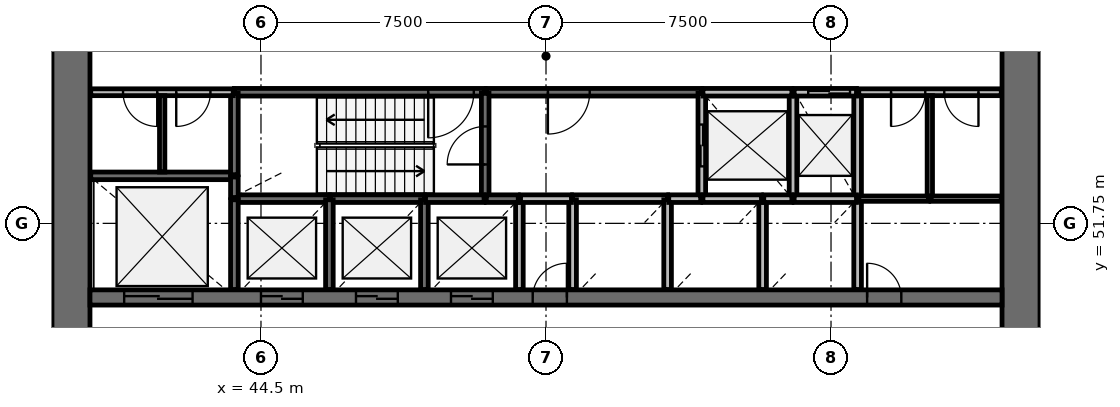
"""IFC4 building model, lengths in metres.
Left out: names, types, materials, properties, quantities, classifications, styles, units other than length and angle.
Written with IfcOpenShell. Run it as: python <this file> out.ifc"""

import sys

from ifc_helpers import new_model, si_unit, direction, frame, frame_2d, origin, place, context, subcontext, project, spatial, rectangle, extrude, source, transform, mapped, element, fill, save


model = new_model("IFC4")
c1 = context("Model", 3, precision=1e-05, world=origin(), true_north=direction((0.0, 1.0)))
c2 = subcontext(c1, "Body", "Model", "MODEL_VIEW")
j1 = project(units=[si_unit("LENGTHUNIT", "METRE"), si_unit("PLANEANGLEUNIT", "RADIAN")], contexts=[c1])
p1 = place(None, origin())
s1 = spatial("IfcSite", under=j1, at=p1, CompositionType="ELEMENT")
p2 = place(p1, origin())
s2 = spatial("IfcBuilding", under=s1, at=p2, CompositionType="ELEMENT")
p3 = place(p2, frame((0.0, 0.0, 44.6)))
s3 = spatial("IfcBuildingStorey", under=s2, at=p3, CompositionType="ELEMENT", Elevation=44.6)
p4 = place(p3, frame((64.5, 38.0, 0.0), z_axis=(0.0, 0.0, 1.0), x_axis=(0.0, 1.0, 0.0)))
e1 = element("IfcWall", 1, at=p4, inside=s3, PredefinedType="SHEAR", context=c2, shape_type="SweptSolid", body=[
    extrude(rectangle(XDim=20.0, YDim=1.0, at=frame_2d((10.0, 0.0))), origin(), (0.0, 0.0, 1.0), 4.4),
])
p5 = place(p4, frame((9.1, 0.0, 0.0)))
e2 = element("IfcOpeningElement", 2, at=p5, cuts=e1, PredefinedType="OPENING", context=c2, shape_type="SweptSolid", body=[
    extrude(rectangle(XDim=1.8, YDim=2.1, at=frame_2d((0.9, 1.05))), frame((0.0, 0.51, 0.0), z_axis=(0.0, -1.0, 0.0), x_axis=(1.0, 0.0, 0.0)), (0.0, 0.0, 1.0), 1.02),
])
p6 = place(p3, frame((39.5, 58.0, 0.0), z_axis=(0.0, 0.0, 1.0), x_axis=(0.0, -1.0, 0.0)))
e3 = element("IfcWall", 3, at=p6, inside=s3, PredefinedType="SHEAR", context=c2, shape_type="SweptSolid", body=[
    extrude(rectangle(XDim=20.0, YDim=1.0, at=frame_2d((10.0, 0.0))), origin(), (0.0, 0.0, 1.0), 4.4),
])
p7 = place(p6, frame((9.1, 0.0, 0.0)))
e4 = element("IfcOpeningElement", 4, at=p7, cuts=e3, PredefinedType="OPENING", context=c2, shape_type="SweptSolid", body=[
    extrude(rectangle(XDim=1.8, YDim=2.1, at=frame_2d((0.9, 1.05))), frame((0.0, 0.51, 0.0), z_axis=(0.0, -1.0, 0.0), x_axis=(1.0, 0.0, 0.0)), (0.0, 0.0, 1.0), 1.02),
])
p8 = place(p3, frame((40.0, 49.8, 0.0), z_axis=(0.0, 0.0, 1.0), x_axis=(1.0, 0.0, 0.0)))
e5 = element("IfcWall", 5, at=p8, inside=s3, PredefinedType="SHEAR", context=c2, shape_type="SweptSolid", body=[
    extrude(rectangle(XDim=24.0, YDim=0.4, at=frame_2d((12.0, 0.0))), origin(), (0.0, 0.0, 1.0), 4.4),
])
p9 = place(p8, frame((4.5, 0.0, 0.0)))
e6 = element("IfcOpeningElement", 6, at=p9, cuts=e5, PredefinedType="OPENING", context=c2, shape_type="SweptSolid", body=[
    extrude(rectangle(XDim=1.1, YDim=2.1, at=frame_2d((0.55, 1.05))), frame((0.0, 0.21, 0.0), z_axis=(0.0, -1.0, 0.0), x_axis=(1.0, 0.0, 0.0)), (0.0, 0.0, 1.0), 0.42),
])
p10 = place(p8, frame((7.0, 0.0, 0.0)))
e7 = element("IfcOpeningElement", 7, at=p10, cuts=e5, PredefinedType="OPENING", context=c2, shape_type="SweptSolid", body=[
    extrude(rectangle(XDim=1.1, YDim=2.1, at=frame_2d((0.55, 1.05))), frame((0.0, 0.21, 0.0), z_axis=(0.0, -1.0, 0.0), x_axis=(1.0, 0.0, 0.0)), (0.0, 0.0, 1.0), 0.42),
])
p11 = place(p8, frame((9.5, 0.0, 0.0)))
e8 = element("IfcOpeningElement", 8, at=p11, cuts=e5, PredefinedType="OPENING", context=c2, shape_type="SweptSolid", body=[
    extrude(rectangle(XDim=1.1, YDim=2.1, at=frame_2d((0.55, 1.05))), frame((0.0, 0.21, 0.0), z_axis=(0.0, -1.0, 0.0), x_axis=(1.0, 0.0, 0.0)), (0.0, 0.0, 1.0), 0.42),
])
p12 = place(p8, frame((0.9, 0.0, 0.0)))
e9 = element("IfcOpeningElement", 9, at=p12, cuts=e5, PredefinedType="OPENING", context=c2, shape_type="SweptSolid", body=[
    extrude(rectangle(XDim=1.8, YDim=2.4, at=frame_2d((0.9, 1.2))), frame((0.0, 0.21, 0.0), z_axis=(0.0, -1.0, 0.0), x_axis=(1.0, 0.0, 0.0)), (0.0, 0.0, 1.0), 0.42),
])
p13 = place(p8, frame((20.45, 0.0, 0.0)))
e10 = element("IfcOpeningElement", 10, at=p13, cuts=e5, PredefinedType="OPENING", context=c2, shape_type="SweptSolid", body=[
    extrude(rectangle(XDim=0.9, YDim=2.1, at=frame_2d((0.45, 1.05))), frame((0.0, 0.21, 0.0), z_axis=(0.0, -1.0, 0.0), x_axis=(1.0, 0.0, 0.0)), (0.0, 0.0, 1.0), 0.42),
])
p14 = place(p8, frame((11.65, 0.0, 0.0)))
e11 = element("IfcOpeningElement", 11, at=p14, cuts=e5, PredefinedType="OPENING", context=c2, shape_type="SweptSolid", body=[
    extrude(rectangle(XDim=0.9, YDim=2.1, at=frame_2d((0.45, 1.05))), frame((0.0, 0.21, 0.0), z_axis=(0.0, -1.0, 0.0), x_axis=(1.0, 0.0, 0.0)), (0.0, 0.0, 1.0), 0.42),
])
p15 = place(p3, frame((50.4, 55.2, 0.0), z_axis=(0.0, 0.0, 1.0), x_axis=(-1.0, 0.0, 0.0)))
e12 = element("IfcWall", 12, at=p15, inside=s3, PredefinedType="SOLIDWALL", context=c2, shape_type="SweptSolid", body=[
    extrude(rectangle(XDim=6.6, YDim=0.2, at=frame_2d((3.3, 0.0))), origin(), (0.0, 0.0, 1.0), 3.95),
])
p16 = place(p15, frame((0.3, 0.0, 0.0)))
e13 = element("IfcOpeningElement", 13, at=p16, cuts=e12, PredefinedType="OPENING", context=c2, shape_type="SweptSolid", body=[
    extrude(rectangle(XDim=1.2, YDim=2.1, at=frame_2d((0.6, 1.05))), frame((0.0, 0.11, 0.0), z_axis=(0.0, -1.0, 0.0), x_axis=(1.0, 0.0, 0.0)), (0.0, 0.0, 1.0), 0.22),
])
p17 = place(p3, frame((56.1, 55.2, 0.0), z_axis=(0.0, 0.0, 1.0), x_axis=(-1.0, 0.0, 0.0)))
e14 = element("IfcWall", 14, at=p17, inside=s3, PredefinedType="SOLIDWALL", context=c2, shape_type="SweptSolid", body=[
    extrude(rectangle(XDim=5.67, YDim=0.2, at=frame_2d((2.835, 0.0))), origin(), (0.0, 0.0, 1.0), 3.95),
])
p18 = place(p17, frame((2.95, 0.0, 0.0)))
e15 = element("IfcOpeningElement", 15, at=p18, cuts=e14, PredefinedType="OPENING", context=c2, shape_type="SweptSolid", body=[
    extrude(rectangle(XDim=1.1, YDim=2.1, at=frame_2d((0.55, 1.05))), frame((0.0, 0.11, 0.0), z_axis=(0.0, -1.0, 0.0), x_axis=(1.0, 0.0, 0.0)), (0.0, 0.0, 1.0), 0.22),
])
p19 = place(p3, frame((43.8, 53.0, 0.0), z_axis=(0.0, 0.0, 1.0), x_axis=(-1.0, 0.0, 0.0)))
e16 = element("IfcWall", 16, at=p19, inside=s3, PredefinedType="SOLIDWALL", context=c2, shape_type="SweptSolid", body=[
    extrude(rectangle(XDim=3.78, YDim=0.2, at=frame_2d((1.89, 0.0))), origin(), (0.0, 0.0, 1.0), 3.95),
])
p20 = place(p3, frame((50.4, 52.4, 0.0), z_axis=(0.0, 0.0, 1.0), x_axis=(0.0, 1.0, 0.0)))
e17 = element("IfcWall", 17, at=p20, inside=s3, PredefinedType="SOLIDWALL", context=c2, shape_type="SweptSolid", body=[
    extrude(rectangle(XDim=2.77, YDim=0.2, at=frame_2d((1.385, 0.0))), origin(), (0.0, 0.0, 1.0), 3.95),
])
p21 = place(p20, frame((0.9, 0.0, 0.0)))
e18 = element("IfcOpeningElement", 18, at=p21, cuts=e17, PredefinedType="OPENING", context=c2, shape_type="SweptSolid", body=[
    extrude(rectangle(XDim=1.0, YDim=2.1, at=frame_2d((0.5, 1.05))), frame((0.0, 0.11, 0.0), z_axis=(0.0, -1.0, 0.0), x_axis=(1.0, 0.0, 0.0)), (0.0, 0.0, 1.0), 0.22),
])
p22 = place(p3, frame((56.1, 55.17, 0.0), z_axis=(0.0, 0.0, 1.0), x_axis=(0.0, -1.0, 0.0)))
e19 = element("IfcWall", 19, at=p22, inside=s3, PredefinedType="SOLIDWALL", context=c2, shape_type="SweptSolid", body=[
    extrude(rectangle(XDim=2.77, YDim=0.2, at=frame_2d((1.385, 0.0))), origin(), (0.0, 0.0, 1.0), 3.95),
])
p23 = place(p22, frame((0.82, 0.0, 0.0)))
e20 = element("IfcOpeningElement", 20, at=p23, cuts=e19, PredefinedType="OPENING", context=c2, shape_type="SweptSolid", body=[
    extrude(rectangle(XDim=1.1, YDim=2.1, at=frame_2d((0.55, 1.05))), frame((0.0, 0.11, 0.0), z_axis=(0.0, -1.0, 0.0), x_axis=(1.0, 0.0, 0.0)), (0.0, 0.0, 1.0), 0.22),
])
for number, where, z_axis, x_axis in (
    (21, (58.5, 52.4, 0.0), (0.0, 0.0, 1.0), (0.0, 1.0, 0.0)),
    (22, (60.2, 52.4, 0.0), (0.0, 0.0, 1.0), (0.0, 1.0, 0.0)),
):
    element("IfcWall", number, at=place(p3, frame(where, z_axis=z_axis, x_axis=x_axis)), inside=s3, PredefinedType="SOLIDWALL", context=c2, shape_type="SweptSolid", body=[
        extrude(rectangle(XDim=2.8, YDim=0.2, at=frame_2d((1.4, 0.0))), origin(), (0.0, 0.0, 1.0), 3.95),
    ])
p24 = place(p3, frame((46.3, 52.4, 0.0), z_axis=(0.0, 0.0, 1.0), x_axis=(-1.0, 0.0, 0.0)))
e23 = element("IfcWall", 23, at=p24, inside=s3, PredefinedType="SOLIDWALL", context=c2, shape_type="SweptSolid", body=[
    extrude(rectangle(XDim=2.5, YDim=0.2, at=frame_2d((1.25, 0.0))), origin(), (0.0, 0.0, 1.0), 3.95),
])
p25 = place(p3, frame((48.8, 52.4, 0.0), z_axis=(0.0, 0.0, 1.0), x_axis=(-1.0, 0.0, 0.0)))
e24 = element("IfcWall", 24, at=p25, inside=s3, PredefinedType="SOLIDWALL", context=c2, shape_type="SweptSolid", body=[
    extrude(rectangle(XDim=2.47, YDim=0.2, at=frame_2d((1.235, 0.0))), origin(), (0.0, 0.0, 1.0), 3.95),
])
p26 = place(p3, frame((55.2, 52.4, 0.0), z_axis=(0.0, 0.0, 1.0), x_axis=(-1.0, 0.0, 0.0)))
e25 = element("IfcWall", 25, at=p26, inside=s3, PredefinedType="SOLIDWALL", context=c2, shape_type="SweptSolid", body=[
    extrude(rectangle(XDim=2.5, YDim=0.2, at=frame_2d((1.25, 0.0))), origin(), (0.0, 0.0, 1.0), 3.95),
])
p27 = place(p3, frame((58.47, 55.2, 0.0), z_axis=(0.0, 0.0, 1.0), x_axis=(-1.0, 0.0, 0.0)))
e26 = element("IfcWall", 26, at=p27, inside=s3, PredefinedType="SOLIDWALL", context=c2, shape_type="SweptSolid", body=[
    extrude(rectangle(XDim=2.34, YDim=0.2, at=frame_2d((1.17, 0.0))), origin(), (0.0, 0.0, 1.0), 3.95),
])
for number, where, z_axis, x_axis in (
    (27, (43.8, 52.37, 0.0), (0.0, 0.0, 1.0), (0.0, -1.0, 0.0)),
    (28, (46.3, 50.01, 0.0), (0.0, 0.0, 1.0), (0.0, 1.0, 0.0)),
    (29, (48.8, 50.01, 0.0), (0.0, 0.0, 1.0), (0.0, 1.0, 0.0)),
):
    element("IfcWall", number, at=place(p3, frame(where, z_axis=z_axis, x_axis=x_axis)), inside=s3, PredefinedType="SOLIDWALL", context=c2, shape_type="SweptSolid", body=[
        extrude(rectangle(XDim=2.36, YDim=0.2, at=frame_2d((1.18, 0.0))), origin(), (0.0, 0.0, 1.0), 3.95),
    ])
p28 = place(p3, frame((51.3, 50.01, 0.0), z_axis=(0.0, 0.0, 1.0), x_axis=(0.0, 1.0, 0.0)))
e30 = element("IfcWall", 30, at=p28, inside=s3, PredefinedType="SOLIDWALL", context=c2, shape_type="SweptSolid", body=[
    extrude(rectangle(XDim=2.39, YDim=0.2, at=frame_2d((1.195, 0.0))), origin(), (0.0, 0.0, 1.0), 3.95),
])
for number, where, z_axis, x_axis in (
    (31, (52.7, 52.37, 0.0), (0.0, 0.0, 1.0), (0.0, -1.0, 0.0)),
    (32, (55.2, 50.01, 0.0), (0.0, 0.0, 1.0), (0.0, 1.0, 0.0)),
):
    element("IfcWall", number, at=place(p3, frame(where, z_axis=z_axis, x_axis=x_axis)), inside=s3, PredefinedType="SOLIDWALL", context=c2, shape_type="SweptSolid", body=[
        extrude(rectangle(XDim=2.36, YDim=0.2, at=frame_2d((1.18, 0.0))), origin(), (0.0, 0.0, 1.0), 3.95),
    ])
p29 = place(p3, frame((57.7, 50.01, 0.0), z_axis=(0.0, 0.0, 1.0), x_axis=(0.0, 1.0, 0.0)))
e33 = element("IfcWall", 33, at=p29, inside=s3, PredefinedType="SOLIDWALL", context=c2, shape_type="SweptSolid", body=[
    extrude(rectangle(XDim=2.39, YDim=0.2, at=frame_2d((1.195, 0.0))), origin(), (0.0, 0.0, 1.0), 3.95),
])
p30 = place(p3, frame((60.2, 50.01, 0.0), z_axis=(0.0, 0.0, 1.0), x_axis=(0.0, 1.0, 0.0)))
e34 = element("IfcWall", 34, at=p30, inside=s3, PredefinedType="SOLIDWALL", context=c2, shape_type="SweptSolid", body=[
    extrude(rectangle(XDim=2.36, YDim=0.2, at=frame_2d((1.18, 0.0))), origin(), (0.0, 0.0, 1.0), 3.95),
])
p31 = place(p3, frame((43.8, 55.17, 0.0), z_axis=(0.0, 0.0, 1.0), x_axis=(0.0, -1.0, 0.0)))
e35 = element("IfcWall", 35, at=p31, inside=s3, PredefinedType="SOLIDWALL", context=c2, shape_type="SweptSolid", body=[
    extrude(rectangle(XDim=2.14, YDim=0.2, at=frame_2d((1.07, 0.0))), origin(), (0.0, 0.0, 1.0), 3.95),
])
p32 = place(p3, frame((60.17, 52.4, 0.0), z_axis=(0.0, 0.0, 1.0), x_axis=(-1.0, 0.0, 0.0)))
e36 = element("IfcWall", 36, at=p32, inside=s3, PredefinedType="SOLIDWALL", context=c2, shape_type="SweptSolid", body=[
    extrude(rectangle(XDim=1.64, YDim=0.2, at=frame_2d((0.82, 0.0))), origin(), (0.0, 0.0, 1.0), 3.95),
])
p33 = place(p3, frame((60.17, 55.2, 0.0), z_axis=(0.0, 0.0, 1.0), x_axis=(-1.0, 0.0, 0.0)))
e37 = element("IfcWall", 37, at=p33, inside=s3, PredefinedType="SOLIDWALL", context=c2, shape_type="SweptSolid", body=[
    extrude(rectangle(XDim=1.64, YDim=0.2, at=frame_2d((0.82, 0.0))), origin(), (0.0, 0.0, 1.0), 3.95),
])
p34 = place(p33, frame((0.17, 0.0, 0.0)))
e38 = element("IfcOpeningElement", 38, at=p34, cuts=e37, PredefinedType="OPENING", context=c2, shape_type="SweptSolid", body=[
    extrude(rectangle(XDim=1.1, YDim=2.1, at=frame_2d((0.55, 1.05))), frame((0.0, 0.11, 0.0), z_axis=(0.0, -1.0, 0.0), x_axis=(1.0, 0.0, 0.0)), (0.0, 0.0, 1.0), 0.22),
])
for number, where, z_axis, x_axis in (
    (39, (50.37, 52.4, 0.0), (0.0, 0.0, 1.0), (-1.0, 0.0, 0.0)),
    (40, (57.67, 52.4, 0.0), (0.0, 0.0, 1.0), (-1.0, 0.0, 0.0)),
):
    element("IfcWall", number, at=place(p3, frame(where, z_axis=z_axis, x_axis=x_axis)), inside=s3, PredefinedType="SOLIDWALL", context=c2, shape_type="SweptSolid", body=[
        extrude(rectangle(XDim=1.54, YDim=0.2, at=frame_2d((0.77, 0.0))), origin(), (0.0, 0.0, 1.0), 3.95),
    ])
p35 = place(p3, frame((51.33, 52.4, 0.0), z_axis=(0.0, 0.0, 1.0), x_axis=(1.0, 0.0, 0.0)))
e41 = element("IfcWall", 41, at=p35, inside=s3, PredefinedType="SOLIDWALL", context=c2, shape_type="SweptSolid", body=[
    extrude(rectangle(XDim=1.34, YDim=0.2, at=frame_2d((0.67, 0.0))), origin(), (0.0, 0.0, 1.0), 3.95),
])
for number, where, z_axis, x_axis in (
    (42, (51.27, 52.4, 0.0), (0.0, 0.0, 1.0), (-1.0, 0.0, 0.0)),
    (43, (56.07, 52.4, 0.0), (0.0, 0.0, 1.0), (-1.0, 0.0, 0.0)),
):
    element("IfcWall", number, at=place(p3, frame(where, z_axis=z_axis, x_axis=x_axis)), inside=s3, PredefinedType="SOLIDWALL", context=c2, shape_type="SweptSolid", body=[
        extrude(rectangle(XDim=0.84, YDim=0.2, at=frame_2d((0.42, 0.0))), origin(), (0.0, 0.0, 1.0), 3.95),
    ])
p36 = place(p3, frame((58.47, 52.4, 0.0), z_axis=(0.0, 0.0, 1.0), x_axis=(-1.0, 0.0, 0.0)))
e44 = element("IfcWall", 44, at=p36, inside=s3, PredefinedType="SOLIDWALL", context=c2, shape_type="SweptSolid", body=[
    extrude(rectangle(XDim=0.74, YDim=0.2, at=frame_2d((0.37, 0.0))), origin(), (0.0, 0.0, 1.0), 3.95),
])
p37 = place(p3, frame((43.8, 52.43, 0.0), z_axis=(0.0, 0.0, 1.0), x_axis=(0.0, 1.0, 0.0)))
e45 = element("IfcWall", 45, at=p37, inside=s3, PredefinedType="SOLIDWALL", context=c2, shape_type="SweptSolid", body=[
    extrude(rectangle(XDim=0.54, YDim=0.2, at=frame_2d((0.27, 0.0))), origin(), (0.0, 0.0, 1.0), 3.95),
])
p38 = place(p3, frame((43.77, 55.2, 0.0), z_axis=(0.0, 0.0, 1.0), x_axis=(-1.0, 0.0, 0.0)))
e46 = element("IfcWall", 46, at=p38, inside=s3, PredefinedType="PARTITIONING", context=c2, shape_type="SweptSolid", body=[
    extrude(rectangle(XDim=3.75, YDim=0.18, at=frame_2d((1.875, 0.0))), origin(), (0.0, 0.0, 1.0), 3.95),
])
p39 = place(p38, frame((2.0, 0.0, 0.0)))
e47 = element("IfcOpeningElement", 47, at=p39, cuts=e46, PredefinedType="OPENING", context=c2, shape_type="SweptSolid", body=[
    extrude(rectangle(XDim=0.9, YDim=2.1, at=frame_2d((0.45, 1.05))), frame((0.0, 0.1, 0.0), z_axis=(0.0, -1.0, 0.0), x_axis=(1.0, 0.0, 0.0)), (0.0, 0.0, 1.0), 0.2),
])
p40 = place(p38, frame((0.6, 0.0, 0.0)))
e48 = element("IfcOpeningElement", 48, at=p40, cuts=e46, PredefinedType="OPENING", context=c2, shape_type="SweptSolid", body=[
    extrude(rectangle(XDim=0.9, YDim=2.1, at=frame_2d((0.45, 1.05))), frame((0.0, 0.1, 0.0), z_axis=(0.0, -1.0, 0.0), x_axis=(1.0, 0.0, 0.0)), (0.0, 0.0, 1.0), 0.2),
])
p41 = place(p3, frame((63.98, 55.2, 0.0), z_axis=(0.0, 0.0, 1.0), x_axis=(-1.0, 0.0, 0.0)))
e49 = element("IfcWall", 49, at=p41, inside=s3, PredefinedType="PARTITIONING", context=c2, shape_type="SweptSolid", body=[
    extrude(rectangle(XDim=3.75, YDim=0.18, at=frame_2d((1.875, 0.0))), origin(), (0.0, 0.0, 1.0), 3.95),
])
p42 = place(p41, frame((2.0, 0.0, 0.0)))
e50 = element("IfcOpeningElement", 50, at=p42, cuts=e49, PredefinedType="OPENING", context=c2, shape_type="SweptSolid", body=[
    extrude(rectangle(XDim=0.9, YDim=2.1, at=frame_2d((0.45, 1.05))), frame((0.0, 0.1, 0.0), z_axis=(0.0, -1.0, 0.0), x_axis=(1.0, 0.0, 0.0)), (0.0, 0.0, 1.0), 0.2),
])
p43 = place(p41, frame((0.6, 0.0, 0.0)))
e51 = element("IfcOpeningElement", 51, at=p43, cuts=e49, PredefinedType="OPENING", context=c2, shape_type="SweptSolid", body=[
    extrude(rectangle(XDim=0.9, YDim=2.1, at=frame_2d((0.45, 1.05))), frame((0.0, 0.1, 0.0), z_axis=(0.0, -1.0, 0.0), x_axis=(1.0, 0.0, 0.0)), (0.0, 0.0, 1.0), 0.2),
])
p44 = place(p3, frame((62.1, 52.4, 0.0), z_axis=(0.0, 0.0, 1.0), x_axis=(0.0, 1.0, 0.0)))
e52 = element("IfcWall", 52, at=p44, inside=s3, PredefinedType="PARTITIONING", context=c2, shape_type="SweptSolid", body=[
    extrude(rectangle(XDim=2.71, YDim=0.14, at=frame_2d((1.355, 0.0))), origin(), (0.0, 0.0, 1.0), 3.05),
])
p45 = place(p3, frame((41.9, 53.1, 0.0), z_axis=(0.0, 0.0, 1.0), x_axis=(0.0, 1.0, 0.0)))
e53 = element("IfcWall", 53, at=p45, inside=s3, PredefinedType="PARTITIONING", context=c2, shape_type="SweptSolid", body=[
    extrude(rectangle(XDim=2.01, YDim=0.14, at=frame_2d((1.005, 0.0))), origin(), (0.0, 0.0, 1.0), 3.05),
])
p46 = place(p3, frame((62.07, 52.4, 0.0), z_axis=(0.0, 0.0, 1.0), x_axis=(-1.0, 0.0, 0.0)))
e54 = element("IfcWall", 54, at=p46, inside=s3, PredefinedType="PARTITIONING", context=c2, shape_type="SweptSolid", body=[
    extrude(rectangle(XDim=1.84, YDim=0.14, at=frame_2d((0.92, 0.0))), origin(), (0.0, 0.0, 1.0), 3.05),
])
p47 = place(p3, frame((63.98, 52.4, 0.0), z_axis=(0.0, 0.0, 1.0), x_axis=(-1.0, 0.0, 0.0)))
e55 = element("IfcWall", 55, at=p47, inside=s3, PredefinedType="PARTITIONING", context=c2, shape_type="SweptSolid", body=[
    extrude(rectangle(XDim=1.85, YDim=0.14, at=frame_2d((0.925, 0.0))), origin(), (0.0, 0.0, 1.0), 3.05),
])
m1 = source(origin(), c2, "Body", "SweptSolid", [
    extrude(rectangle(XDim=1.1, YDim=2.1, at=frame_2d((0.55, 1.05))), frame((0.0, 0.025, 0.0), z_axis=(0.0, -1.0, 0.0), x_axis=(1.0, 0.0, 0.0)), (0.0, 0.0, 1.0), 0.05),
])
p48 = place(p9, origin())
e56 = element("IfcDoor", 56, at=p48, inside=s3, OperationType="DOUBLE_DOOR_SLIDING", PredefinedType="USERDEFINED", context=c2, shape_type="MappedRepresentation", body=[
    mapped(m1, transform((0.0, 0.0, 0.0), scale=1.0)),
])
fill(e6, e56)
p49 = place(p10, origin())
e57 = element("IfcDoor", 57, at=p49, inside=s3, OperationType="DOUBLE_DOOR_SLIDING", PredefinedType="USERDEFINED", context=c2, shape_type="MappedRepresentation", body=[
    mapped(m1, transform((0.0, 0.0, 0.0), scale=1.0)),
])
fill(e7, e57)
p50 = place(p11, origin())
e58 = element("IfcDoor", 58, at=p50, inside=s3, OperationType="DOUBLE_DOOR_SLIDING", PredefinedType="USERDEFINED", context=c2, shape_type="MappedRepresentation", body=[
    mapped(m1, transform((0.0, 0.0, 0.0), scale=1.0)),
])
fill(e8, e58)
p51 = place(p23, origin())
e59 = element("IfcDoor", 59, at=p51, inside=s3, OperationType="DOUBLE_DOOR_SLIDING", PredefinedType="USERDEFINED", context=c2, shape_type="MappedRepresentation", body=[
    mapped(m1, transform((0.0, 0.0, 0.0), scale=1.0)),
])
fill(e20, e59)
p52 = place(p34, origin())
e60 = element("IfcDoor", 60, at=p52, inside=s3, OperationType="DOUBLE_DOOR_SLIDING", PredefinedType="USERDEFINED", context=c2, shape_type="MappedRepresentation", body=[
    mapped(m1, transform((0.0, 0.0, 0.0), scale=1.0)),
])
fill(e38, e60)
m2 = source(origin(), c2, "Body", "SweptSolid", [
    extrude(rectangle(XDim=1.8, YDim=2.4, at=frame_2d((0.9, 1.2))), frame((0.0, 0.025, 0.0), z_axis=(0.0, -1.0, 0.0), x_axis=(1.0, 0.0, 0.0)), (0.0, 0.0, 1.0), 0.05),
])
p53 = place(p12, origin())
e61 = element("IfcDoor", 61, at=p53, inside=s3, OperationType="DOUBLE_DOOR_SLIDING", PredefinedType="USERDEFINED", context=c2, shape_type="MappedRepresentation", body=[
    mapped(m2, transform((0.0, 0.0, 0.0), scale=1.0)),
])
fill(e9, e61)
m3 = source(origin(), c2, "Body", "SweptSolid", [
    extrude(rectangle(XDim=1.2, YDim=2.1, at=frame_2d((0.6, 1.05))), frame((0.0, 0.025, 0.0), z_axis=(0.0, -1.0, 0.0), x_axis=(1.0, 0.0, 0.0)), (0.0, 0.0, 1.0), 0.05),
])
p54 = place(p16, origin())
e62 = element("IfcDoor", 62, at=p54, inside=s3, OperationType="SINGLE_SWING_RIGHT", PredefinedType="DOOR", context=c2, shape_type="MappedRepresentation", body=[
    mapped(m3, transform((0.0, 0.0, 0.0), scale=1.0)),
])
fill(e13, e62)
m4 = source(origin(), c2, "Body", "SweptSolid", [
    extrude(rectangle(XDim=1.0, YDim=2.1, at=frame_2d((0.5, 1.05))), frame((0.0, 0.025, 0.0), z_axis=(0.0, -1.0, 0.0), x_axis=(1.0, 0.0, 0.0)), (0.0, 0.0, 1.0), 0.05),
])
p55 = place(p21, origin())
e63 = element("IfcDoor", 63, at=p55, inside=s3, OperationType="SINGLE_SWING_LEFT", PredefinedType="DOOR", context=c2, shape_type="MappedRepresentation", body=[
    mapped(m4, transform((0.0, 0.0, 0.0), scale=1.0)),
])
fill(e18, e63)
m5 = source(origin(), c2, "Body", "SweptSolid", [
    extrude(rectangle(XDim=1.1, YDim=2.1, at=frame_2d((0.55, 1.05))), frame((0.0, 0.025, 0.0), z_axis=(0.0, -1.0, 0.0), x_axis=(1.0, 0.0, 0.0)), (0.0, 0.0, 1.0), 0.05),
])
p56 = place(p18, origin())
e64 = element("IfcDoor", 64, at=p56, inside=s3, OperationType="SINGLE_SWING_RIGHT", PredefinedType="DOOR", context=c2, shape_type="MappedRepresentation", body=[
    mapped(m5, transform((0.0, 0.0, 0.0), scale=1.0)),
])
fill(e15, e64)
m6 = source(origin(), c2, "Body", "SweptSolid", [
    extrude(rectangle(XDim=0.9, YDim=2.1, at=frame_2d((0.45, 1.05))), frame((0.0, 0.025, 0.0), z_axis=(0.0, -1.0, 0.0), x_axis=(1.0, 0.0, 0.0)), (0.0, 0.0, 1.0), 0.05),
])
p57 = place(p39, origin())
e65 = element("IfcDoor", 65, at=p57, inside=s3, OperationType="SINGLE_SWING_LEFT", PredefinedType="DOOR", context=c2, shape_type="MappedRepresentation", body=[
    mapped(m6, transform((0.0, 0.0, 0.0), scale=1.0)),
])
fill(e47, e65)
p58 = place(p40, origin())
e66 = element("IfcDoor", 66, at=p58, inside=s3, OperationType="SINGLE_SWING_RIGHT", PredefinedType="DOOR", context=c2, shape_type="MappedRepresentation", body=[
    mapped(m6, transform((0.0, 0.0, 0.0), scale=1.0)),
])
fill(e48, e66)
p59 = place(p13, origin())
e67 = element("IfcDoor", 67, at=p59, inside=s3, OperationType="SINGLE_SWING_LEFT", PredefinedType="DOOR", context=c2, shape_type="MappedRepresentation", body=[
    mapped(m6, transform((0.0, 0.0, 0.0), scale=1.0)),
])
fill(e10, e67)
p60 = place(p42, origin())
e68 = element("IfcDoor", 68, at=p60, inside=s3, OperationType="SINGLE_SWING_RIGHT", PredefinedType="DOOR", context=c2, shape_type="MappedRepresentation", body=[
    mapped(m6, transform((0.0, 0.0, 0.0), scale=1.0)),
])
fill(e50, e68)
p61 = place(p43, origin())
e69 = element("IfcDoor", 69, at=p61, inside=s3, OperationType="SINGLE_SWING_LEFT", PredefinedType="DOOR", context=c2, shape_type="MappedRepresentation", body=[
    mapped(m6, transform((0.0, 0.0, 0.0), scale=1.0)),
])
fill(e51, e69)
p62 = place(p14, origin())
e70 = element("IfcDoor", 70, at=p62, inside=s3, OperationType="SINGLE_SWING_RIGHT", PredefinedType="DOOR", context=c2, shape_type="MappedRepresentation", body=[
    mapped(m6, transform((0.0, 0.0, 0.0), scale=1.0)),
])
fill(e11, e70)
save(model, sys.argv[1])
